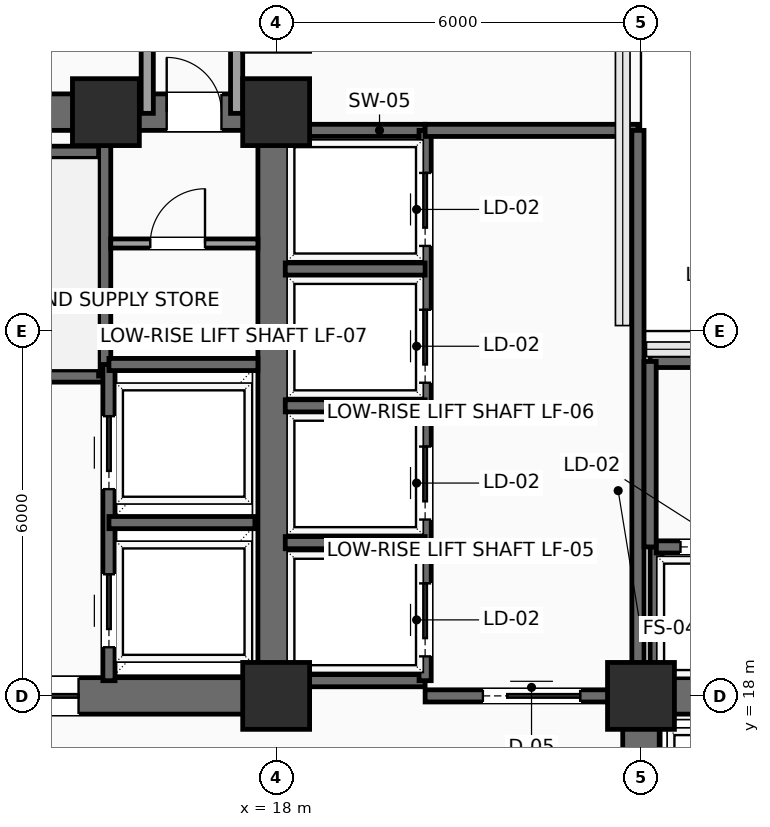
"""IFC4 building model, lengths in metres.
Left out: names, types, materials, properties, quantities, classifications, styles, units other than length and angle.
Written with IfcOpenShell. Run it as: python <this file> out.ifc"""

import sys

from ifc_helpers import new_model, si_unit, direction, frame, frame_2d, origin, origin_2d, place, context, subcontext, project, spatial, rectangle, extrude, element, fill, save


model = new_model("IFC4")
c1 = context("Model", 3, precision=1e-05, world=origin(), true_north=direction((0.0, 1.0)))
c2 = subcontext(c1, "Body", "Model", "MODEL_VIEW")
j1 = project(units=[si_unit("LENGTHUNIT", "METRE"), si_unit("PLANEANGLEUNIT", "RADIAN")], contexts=[c1])
p1 = place(None, origin())
s1 = spatial("IfcSite", under=j1, at=p1, CompositionType="ELEMENT")
p2 = place(p1, origin())
s2 = spatial("IfcBuilding", under=s1, at=p2, CompositionType="ELEMENT")
p3 = place(p2, frame((0.0, 0.0, 110.85)))
s3 = spatial("IfcBuildingStorey", under=s2, at=p3, CompositionType="ELEMENT", Elevation=110.85)
for number, where, z_axis, x_axis in (
    (1, (18.0, 18.0, 0.0), (0.0, 0.0, 1.0), (1.0, 0.0, 0.0)),
    (2, (15.2, 27.6, 0.0), (0.0, 0.0, 1.0), (1.0, 0.0, 0.0)),
    (3, (18.0, 27.6, 0.0), (0.0, 0.0, 1.0), (1.0, 0.0, 0.0)),
    (4, (24.0, 18.0, 0.0), (0.0, 0.0, 1.0), (1.0, 0.0, 0.0)),
):
    element("IfcColumn", number, at=place(p3, frame(where, z_axis=z_axis, x_axis=x_axis)), inside=s3, PredefinedType="COLUMN", context=c2, shape_type="SweptSolid", body=[
        extrude(rectangle(XDim=1.1, YDim=1.1, at=origin_2d()), origin(), (0.0, 0.0, 1.0), 4.8),
    ])
p4 = place(p3, frame((6.0, 18.0, 0.0), z_axis=(0.0, 0.0, 1.0), x_axis=(1.0, 0.0, 0.0)))
e5 = element("IfcWall", 5, at=p4, inside=s3, PredefinedType="SHEAR", context=c2, shape_type="SweptSolid", body=[
    extrude(rectangle(XDim=12.0, YDim=0.6, at=frame_2d((6.0, 0.0))), origin(), (0.0, 0.0, 1.0), 4.575),
])
p5 = place(p4, frame((7.15, 0.0, 0.0)))
e6 = element("IfcOpeningElement", 6, at=p5, cuts=e5, PredefinedType="OPENING", context=c2, shape_type="SweptSolid", body=[
    extrude(rectangle(XDim=1.6, YDim=2.3, at=frame_2d((0.8, 1.15))), frame((0.0, 0.31, 0.0), z_axis=(0.0, -1.0, 0.0), x_axis=(1.0, 0.0, 0.0)), (0.0, 0.0, 1.0), 0.62),
])
p6 = place(p3, frame((6.0, 27.6, 0.0), z_axis=(0.0, 0.0, 1.0), x_axis=(1.0, 0.0, 0.0)))
e7 = element("IfcWall", 7, at=p6, inside=s3, PredefinedType="SHEAR", context=c2, shape_type="SweptSolid", body=[
    extrude(rectangle(XDim=12.0, YDim=0.6, at=frame_2d((6.0, 0.0))), origin(), (0.0, 0.0, 1.0), 4.575),
])
p7 = place(p6, frame((10.2, 0.0, 0.0)))
e8 = element("IfcOpeningElement", 8, at=p7, cuts=e7, PredefinedType="OPENING", context=c2, shape_type="SweptSolid", body=[
    extrude(rectangle(XDim=0.9, YDim=2.15, at=frame_2d((0.45, 1.075))), frame((0.0, 0.31, 0.0), z_axis=(0.0, -1.0, 0.0), x_axis=(1.0, 0.0, 0.0)), (0.0, 0.0, 1.0), 0.62),
])
for number, where, z_axis, x_axis in (
    (9, (18.0, 18.0, 0.0), (0.0, 0.0, 1.0), (0.0, 1.0, 0.0)),
    (10, (24.0, 18.0, 0.0), (0.0, 0.0, 1.0), (1.0, 0.0, 0.0)),
):
    element("IfcWall", number, at=place(p3, frame(where, z_axis=z_axis, x_axis=x_axis)), inside=s3, PredefinedType="SHEAR", context=c2, shape_type="SweptSolid", body=[
        extrude(rectangle(XDim=9.6, YDim=0.6, at=frame_2d((4.8, 0.0))), origin(), (0.0, 0.0, 1.0), 4.575),
    ])
p8 = place(p3, frame((24.0, 6.0, 0.0), z_axis=(0.0, 0.0, 1.0), x_axis=(0.0, 1.0, 0.0)))
e11 = element("IfcWall", 11, at=p8, inside=s3, PredefinedType="SHEAR", context=c2, shape_type="SweptSolid", body=[
    extrude(rectangle(XDim=12.0, YDim=0.6, at=frame_2d((6.0, 0.0))), origin(), (0.0, 0.0, 1.0), 4.575),
])
p9 = place(p8, frame((7.15, 0.0, 0.0)))
e12 = element("IfcOpeningElement", 12, at=p9, cuts=e11, PredefinedType="OPENING", context=c2, shape_type="SweptSolid", body=[
    extrude(rectangle(XDim=1.6, YDim=2.3, at=frame_2d((0.8, 1.15))), frame((0.0, 0.31, 0.0), z_axis=(0.0, -1.0, 0.0), x_axis=(1.0, 0.0, 0.0)), (0.0, 0.0, 1.0), 0.62),
])
p10 = place(p3, frame((6.3, 23.26, 0.0), z_axis=(0.0, 0.0, 1.0), x_axis=(1.0, 0.0, 0.0)))
e13 = element("IfcWall", 13, at=p10, inside=s3, PredefinedType="SHEAR", context=c2, shape_type="SweptSolid", body=[
    extrude(rectangle(XDim=8.88, YDim=0.2, at=frame_2d((4.44, 0.0))), origin(), (0.0, 0.0, 1.0), 4.575),
])
p11 = place(p10, frame((0.35, 0.0, 0.0)))
e14 = element("IfcOpeningElement", 14, at=p11, cuts=e13, PredefinedType="OPENING", context=c2, shape_type="SweptSolid", body=[
    extrude(rectangle(XDim=1.1, YDim=2.2, at=frame_2d((0.55, 1.1))), frame((0.0, 0.11, 0.0), z_axis=(0.0, -1.0, 0.0), x_axis=(1.0, 0.0, 0.0)), (0.0, 0.0, 1.0), 0.22),
])
p12 = place(p3, frame((6.3, 26.94, 0.0), z_axis=(0.0, 0.0, 1.0), x_axis=(1.0, 0.0, 0.0)))
e15 = element("IfcWall", 15, at=p12, inside=s3, PredefinedType="SHEAR", context=c2, shape_type="SweptSolid", body=[
    extrude(rectangle(XDim=8.88, YDim=0.2, at=frame_2d((4.44, 0.0))), origin(), (0.0, 0.0, 1.0), 4.575),
])
p13 = place(p3, frame((15.18, 23.26, 0.0), z_axis=(0.0, 0.0, 1.0), x_axis=(0.0, 1.0, 0.0)))
e16 = element("IfcWall", 16, at=p13, inside=s3, PredefinedType="SHEAR", context=c2, shape_type="SweptSolid", body=[
    extrude(rectangle(XDim=4.04, YDim=0.2, at=frame_2d((2.02, 0.0))), origin(), (0.0, 0.0, 1.0), 4.575),
])
p14 = place(p3, frame((15.25, 18.25, 0.0), z_axis=(0.0, 0.0, 1.0), x_axis=(0.0, 1.0, 0.0)))
e17 = element("IfcWall", 17, at=p14, inside=s3, PredefinedType="SHEAR", context=c2, shape_type="SweptSolid", body=[
    extrude(rectangle(XDim=5.2, YDim=0.2, at=frame_2d((2.6, 0.0))), origin(), (0.0, 0.0, 1.0), 4.575),
])
p15 = place(p14, frame((0.55, 0.0, 0.0)))
e18 = element("IfcOpeningElement", 18, at=p15, cuts=e17, PredefinedType="OPENING", context=c2, shape_type="SweptSolid", body=[
    extrude(rectangle(XDim=1.2, YDim=2.2, at=frame_2d((0.6, 1.1))), frame((0.0, 0.11, 0.0), z_axis=(0.0, -1.0, 0.0), x_axis=(1.0, 0.0, 0.0)), (0.0, 0.0, 1.0), 0.22),
])
p16 = place(p14, frame((3.15, 0.0, 0.0)))
e19 = element("IfcOpeningElement", 19, at=p16, cuts=e17, PredefinedType="OPENING", context=c2, shape_type="SweptSolid", body=[
    extrude(rectangle(XDim=1.2, YDim=2.2, at=frame_2d((0.6, 1.1))), frame((0.0, 0.11, 0.0), z_axis=(0.0, -1.0, 0.0), x_axis=(1.0, 0.0, 0.0)), (0.0, 0.0, 1.0), 0.22),
])
p17 = place(p3, frame((15.25, 20.85, 0.0), z_axis=(0.0, 0.0, 1.0), x_axis=(1.0, 0.0, 0.0)))
e20 = element("IfcWall", 20, at=p17, inside=s3, PredefinedType="SHEAR", context=c2, shape_type="SweptSolid", body=[
    extrude(rectangle(XDim=2.4, YDim=0.2, at=frame_2d((1.2, 0.0))), origin(), (0.0, 0.0, 1.0), 4.575),
])
p18 = place(p3, frame((15.25, 23.45, 0.0), z_axis=(0.0, 0.0, 1.0), x_axis=(1.0, 0.0, 0.0)))
e21 = element("IfcWall", 21, at=p18, inside=s3, PredefinedType="SHEAR", context=c2, shape_type="SweptSolid", body=[
    extrude(rectangle(XDim=2.45, YDim=0.2, at=frame_2d((1.225, 0.0))), origin(), (0.0, 0.0, 1.0), 4.575),
])
p19 = place(p3, frame((15.28, 25.44, 0.0), z_axis=(0.0, 0.0, 1.0), x_axis=(1.0, 0.0, 0.0)))
e22 = element("IfcWall", 22, at=p19, inside=s3, PredefinedType="PARTITIONING", context=c2, shape_type="SweptSolid", body=[
    extrude(rectangle(XDim=2.42, YDim=0.15, at=frame_2d((1.21, 0.0))), origin(), (0.0, 0.0, 1.0), 4.575),
])
p20 = place(p19, frame((0.65, 0.0, 0.0)))
e23 = element("IfcOpeningElement", 23, at=p20, cuts=e22, PredefinedType="OPENING", context=c2, shape_type="SweptSolid", body=[
    extrude(rectangle(XDim=0.9, YDim=2.15, at=frame_2d((0.45, 1.075))), frame((0.0, 0.085, 0.0), z_axis=(0.0, -1.0, 0.0), x_axis=(1.0, 0.0, 0.0)), (0.0, 0.0, 1.0), 0.17),
])
for number, where, z_axis, x_axis in (
    (24, (18.1, 27.3, 0.0), (0.0, 0.0, 1.0), (1.0, 0.0, 0.0)),
    (25, (18.1, 18.25, 0.0), (0.0, 0.0, 1.0), (1.0, 0.0, 0.0)),
):
    element("IfcWall", number, at=place(p3, frame(where, z_axis=z_axis, x_axis=x_axis)), inside=s3, PredefinedType="SHEAR", context=c2, shape_type="SweptSolid", body=[
        extrude(rectangle(XDim=2.35, YDim=0.2, at=frame_2d((1.175, 0.0))), origin(), (0.0, 0.0, 1.0), 4.575),
    ])
p21 = place(p3, frame((20.45, 18.25, 0.0), z_axis=(0.0, 0.0, 1.0), x_axis=(0.0, 1.0, 0.0)))
e26 = element("IfcWall", 26, at=p21, inside=s3, PredefinedType="SHEAR", context=c2, shape_type="SweptSolid", body=[
    extrude(rectangle(XDim=9.05, YDim=0.2, at=frame_2d((4.525, 0.0))), origin(), (0.0, 0.0, 1.0), 4.575),
])
p22 = place(p21, frame((0.4, 0.0, 0.0)))
e27 = element("IfcOpeningElement", 27, at=p22, cuts=e26, PredefinedType="OPENING", context=c2, shape_type="SweptSolid", body=[
    extrude(rectangle(XDim=1.2, YDim=2.2, at=frame_2d((0.6, 1.1))), frame((0.0, 0.11, 0.0), z_axis=(0.0, -1.0, 0.0), x_axis=(1.0, 0.0, 0.0)), (0.0, 0.0, 1.0), 0.22),
])
p23 = place(p21, frame((2.65, 0.0, 0.0)))
e28 = element("IfcOpeningElement", 28, at=p23, cuts=e26, PredefinedType="OPENING", context=c2, shape_type="SweptSolid", body=[
    extrude(rectangle(XDim=1.2, YDim=2.2, at=frame_2d((0.6, 1.1))), frame((0.0, 0.11, 0.0), z_axis=(0.0, -1.0, 0.0), x_axis=(1.0, 0.0, 0.0)), (0.0, 0.0, 1.0), 0.22),
])
p24 = place(p21, frame((4.9, 0.0, 0.0)))
e29 = element("IfcOpeningElement", 29, at=p24, cuts=e26, PredefinedType="OPENING", context=c2, shape_type="SweptSolid", body=[
    extrude(rectangle(XDim=1.2, YDim=2.2, at=frame_2d((0.6, 1.1))), frame((0.0, 0.11, 0.0), z_axis=(0.0, -1.0, 0.0), x_axis=(1.0, 0.0, 0.0)), (0.0, 0.0, 1.0), 0.22),
])
p25 = place(p21, frame((7.15, 0.0, 0.0)))
e30 = element("IfcOpeningElement", 30, at=p25, cuts=e26, PredefinedType="OPENING", context=c2, shape_type="SweptSolid", body=[
    extrude(rectangle(XDim=1.2, YDim=2.2, at=frame_2d((0.6, 1.1))), frame((0.0, 0.11, 0.0), z_axis=(0.0, -1.0, 0.0), x_axis=(1.0, 0.0, 0.0)), (0.0, 0.0, 1.0), 0.22),
])
for number, where, z_axis, x_axis in (
    (31, (18.15, 20.52, 0.0), (0.0, 0.0, 1.0), (1.0, 0.0, 0.0)),
    (32, (18.15, 22.77, 0.0), (0.0, 0.0, 1.0), (1.0, 0.0, 0.0)),
    (33, (18.15, 25.02, 0.0), (0.0, 0.0, 1.0), (1.0, 0.0, 0.0)),
):
    element("IfcWall", number, at=place(p3, frame(where, z_axis=z_axis, x_axis=x_axis)), inside=s3, PredefinedType="SHEAR", context=c2, shape_type="SweptSolid", body=[
        extrude(rectangle(XDim=2.3, YDim=0.2, at=frame_2d((1.15, 0.0))), origin(), (0.0, 0.0, 1.0), 4.575),
    ])
p26 = place(p3, frame((20.45, 18.0, 0.0), z_axis=(0.0, 0.0, 1.0), x_axis=(1.0, 0.0, 0.0)))
e34 = element("IfcWall", 34, at=p26, inside=s3, PredefinedType="SHEAR", context=c2, shape_type="SweptSolid", body=[
    extrude(rectangle(XDim=3.5, YDim=0.2, at=frame_2d((1.75, 0.0))), origin(), (0.0, 0.0, 1.0), 4.575),
])
p27 = place(p26, frame((0.95, 0.0, 0.0)))
e35 = element("IfcOpeningElement", 35, at=p27, cuts=e34, PredefinedType="OPENING", context=c2, shape_type="SweptSolid", body=[
    extrude(rectangle(XDim=1.6, YDim=2.3, at=frame_2d((0.8, 1.15))), frame((0.0, 0.11, 0.0), z_axis=(0.0, -1.0, 0.0), x_axis=(1.0, 0.0, 0.0)), (0.0, 0.0, 1.0), 0.22),
])
p28 = place(p3, frame((20.45, 27.3, 0.0), z_axis=(0.0, 0.0, 1.0), x_axis=(1.0, 0.0, 0.0)))
e36 = element("IfcWall", 36, at=p28, inside=s3, PredefinedType="SHEAR", context=c2, shape_type="SweptSolid", body=[
    extrude(rectangle(XDim=3.5, YDim=0.2, at=frame_2d((1.75, 0.0))), origin(), (0.0, 0.0, 1.0), 4.575),
])
p29 = place(p3, frame((23.95, 18.0, 0.0), z_axis=(0.0, 0.0, 1.0), x_axis=(0.0, 1.0, 0.0)))
e37 = element("IfcWall", 37, at=p29, inside=s3, PredefinedType="SHEAR", context=c2, shape_type="SweptSolid", body=[
    extrude(rectangle(XDim=9.3, YDim=0.2, at=frame_2d((4.65, 0.0))), origin(), (0.0, 0.0, 1.0), 4.575),
])
p30 = place(p3, frame((24.25, 18.1, 0.0), z_axis=(0.0, 0.0, 1.0), x_axis=(0.0, 1.0, 0.0)))
e38 = element("IfcWall", 38, at=p30, inside=s3, PredefinedType="SHEAR", context=c2, shape_type="SweptSolid", body=[
    extrude(rectangle(XDim=2.35, YDim=0.2, at=frame_2d((1.175, 0.0))), origin(), (0.0, 0.0, 1.0), 4.575),
])
p31 = place(p3, frame((24.25, 20.45, 0.0), z_axis=(0.0, 0.0, 1.0), x_axis=(1.0, 0.0, 0.0)))
e39 = element("IfcWall", 39, at=p31, inside=s3, PredefinedType="SHEAR", context=c2, shape_type="SweptSolid", body=[
    extrude(rectangle(XDim=9.05, YDim=0.2, at=frame_2d((4.525, 0.0))), origin(), (0.0, 0.0, 1.0), 4.575),
])
p32 = place(p31, frame((0.4, 0.0, 0.0)))
e40 = element("IfcOpeningElement", 40, at=p32, cuts=e39, PredefinedType="OPENING", context=c2, shape_type="SweptSolid", body=[
    extrude(rectangle(XDim=1.2, YDim=2.2, at=frame_2d((0.6, 1.1))), frame((0.0, 0.11, 0.0), z_axis=(0.0, -1.0, 0.0), x_axis=(1.0, 0.0, 0.0)), (0.0, 0.0, 1.0), 0.22),
])
p33 = place(p31, frame((2.65, 0.0, 0.0)))
e41 = element("IfcOpeningElement", 41, at=p33, cuts=e39, PredefinedType="OPENING", context=c2, shape_type="SweptSolid", body=[
    extrude(rectangle(XDim=1.2, YDim=2.2, at=frame_2d((0.6, 1.1))), frame((0.0, 0.11, 0.0), z_axis=(0.0, -1.0, 0.0), x_axis=(1.0, 0.0, 0.0)), (0.0, 0.0, 1.0), 0.22),
])
p34 = place(p31, frame((4.9, 0.0, 0.0)))
e42 = element("IfcOpeningElement", 42, at=p34, cuts=e39, PredefinedType="OPENING", context=c2, shape_type="SweptSolid", body=[
    extrude(rectangle(XDim=1.2, YDim=2.2, at=frame_2d((0.6, 1.1))), frame((0.0, 0.11, 0.0), z_axis=(0.0, -1.0, 0.0), x_axis=(1.0, 0.0, 0.0)), (0.0, 0.0, 1.0), 0.22),
])
p35 = place(p31, frame((7.15, 0.0, 0.0)))
e43 = element("IfcOpeningElement", 43, at=p35, cuts=e39, PredefinedType="OPENING", context=c2, shape_type="SweptSolid", body=[
    extrude(rectangle(XDim=1.2, YDim=2.2, at=frame_2d((0.6, 1.1))), frame((0.0, 0.11, 0.0), z_axis=(0.0, -1.0, 0.0), x_axis=(1.0, 0.0, 0.0)), (0.0, 0.0, 1.0), 0.22),
])
p36 = place(p3, frame((24.15, 23.5, 0.0), z_axis=(0.0, 0.0, 1.0), x_axis=(1.0, 0.0, 0.0)))
e44 = element("IfcWall", 44, at=p36, inside=s3, PredefinedType="SHEAR", context=c2, shape_type="SweptSolid", body=[
    extrude(rectangle(XDim=9.15, YDim=0.2, at=frame_2d((4.575, 0.0))), origin(), (0.0, 0.0, 1.0), 4.575),
])
p37 = place(p3, frame((24.15, 20.45, 0.0), z_axis=(0.0, 0.0, 1.0), x_axis=(0.0, 1.0, 0.0)))
e45 = element("IfcWall", 45, at=p37, inside=s3, PredefinedType="SHEAR", context=c2, shape_type="SweptSolid", body=[
    extrude(rectangle(XDim=3.05, YDim=0.2, at=frame_2d((1.525, 0.0))), origin(), (0.0, 0.0, 1.0), 4.575),
])
for number, where, z_axis, x_axis in (
    (46, (17.35, 30.25, 0.0), (0.0, 0.0, 1.0), (0.0, -1.0, 0.0)),
    (47, (15.88, 27.58, 0.0), (0.0, 0.0, 1.0), (0.0, 1.0, 0.0)),
):
    element("IfcWall", number, at=place(p3, frame(where, z_axis=z_axis, x_axis=x_axis)), inside=s3, PredefinedType="PARTITIONING", context=c2, shape_type="SweptSolid", body=[
        extrude(rectangle(XDim=2.67, YDim=0.2, at=frame_2d((1.335, 0.0))), origin(), (0.0, 0.0, 1.0), 4.575),
    ])
p38 = place(p5, origin())
e48 = element("IfcDoor", 48, at=p38, inside=s3, OperationType="DOUBLE_DOOR_SLIDING", PredefinedType="DOOR", context=c2, shape_type="SweptSolid", body=[
    extrude(rectangle(XDim=1.6, YDim=2.3, at=frame_2d((0.8, 1.15))), frame((0.0, 0.025, 0.0), z_axis=(0.0, -1.0, 0.0), x_axis=(1.0, 0.0, 0.0)), (0.0, 0.0, 1.0), 0.05),
])
fill(e6, e48)
p39 = place(p7, origin())
e49 = element("IfcDoor", 49, at=p39, inside=s3, OperationType="SINGLE_SWING_LEFT", PredefinedType="DOOR", context=c2, shape_type="SweptSolid", body=[
    extrude(rectangle(XDim=0.9, YDim=2.15, at=frame_2d((0.45, 1.075))), frame((0.0, 0.025, 0.0), z_axis=(0.0, -1.0, 0.0), x_axis=(1.0, 0.0, 0.0)), (0.0, 0.0, 1.0), 0.05),
])
fill(e8, e49)
p40 = place(p15, origin())
e50 = element("IfcDoor", 50, at=p40, inside=s3, OperationType="SLIDING_TO_RIGHT", PredefinedType="DOOR", context=c2, shape_type="SweptSolid", body=[
    extrude(rectangle(XDim=1.2, YDim=2.2, at=frame_2d((0.6, 1.1))), frame((0.0, 0.025, 0.0), z_axis=(0.0, -1.0, 0.0), x_axis=(1.0, 0.0, 0.0)), (0.0, 0.0, 1.0), 0.05),
])
fill(e18, e50)
p41 = place(p16, origin())
e51 = element("IfcDoor", 51, at=p41, inside=s3, OperationType="SLIDING_TO_RIGHT", PredefinedType="DOOR", context=c2, shape_type="SweptSolid", body=[
    extrude(rectangle(XDim=1.2, YDim=2.2, at=frame_2d((0.6, 1.1))), frame((0.0, 0.025, 0.0), z_axis=(0.0, -1.0, 0.0), x_axis=(1.0, 0.0, 0.0)), (0.0, 0.0, 1.0), 0.05),
])
fill(e19, e51)
p42 = place(p20, origin())
e52 = element("IfcDoor", 52, at=p42, inside=s3, OperationType="SINGLE_SWING_RIGHT", PredefinedType="DOOR", context=c2, shape_type="SweptSolid", body=[
    extrude(rectangle(XDim=0.9, YDim=2.15, at=frame_2d((0.45, 1.075))), frame((0.0, 0.025, 0.0), z_axis=(0.0, -1.0, 0.0), x_axis=(1.0, 0.0, 0.0)), (0.0, 0.0, 1.0), 0.05),
])
fill(e23, e52)
p43 = place(p22, origin())
e53 = element("IfcDoor", 53, at=p43, inside=s3, OperationType="SLIDING_TO_RIGHT", PredefinedType="DOOR", context=c2, shape_type="SweptSolid", body=[
    extrude(rectangle(XDim=1.2, YDim=2.2, at=frame_2d((0.6, 1.1))), frame((0.0, 0.025, 0.0), z_axis=(0.0, -1.0, 0.0), x_axis=(1.0, 0.0, 0.0)), (0.0, 0.0, 1.0), 0.05),
])
fill(e27, e53)
p44 = place(p23, origin())
e54 = element("IfcDoor", 54, at=p44, inside=s3, OperationType="SLIDING_TO_RIGHT", PredefinedType="DOOR", context=c2, shape_type="SweptSolid", body=[
    extrude(rectangle(XDim=1.2, YDim=2.2, at=frame_2d((0.6, 1.1))), frame((0.0, 0.025, 0.0), z_axis=(0.0, -1.0, 0.0), x_axis=(1.0, 0.0, 0.0)), (0.0, 0.0, 1.0), 0.05),
])
fill(e28, e54)
p45 = place(p24, origin())
e55 = element("IfcDoor", 55, at=p45, inside=s3, OperationType="SLIDING_TO_RIGHT", PredefinedType="DOOR", context=c2, shape_type="SweptSolid", body=[
    extrude(rectangle(XDim=1.2, YDim=2.2, at=frame_2d((0.6, 1.1))), frame((0.0, 0.025, 0.0), z_axis=(0.0, -1.0, 0.0), x_axis=(1.0, 0.0, 0.0)), (0.0, 0.0, 1.0), 0.05),
])
fill(e29, e55)
p46 = place(p25, origin())
e56 = element("IfcDoor", 56, at=p46, inside=s3, OperationType="SLIDING_TO_RIGHT", PredefinedType="DOOR", context=c2, shape_type="SweptSolid", body=[
    extrude(rectangle(XDim=1.2, YDim=2.2, at=frame_2d((0.6, 1.1))), frame((0.0, 0.025, 0.0), z_axis=(0.0, -1.0, 0.0), x_axis=(1.0, 0.0, 0.0)), (0.0, 0.0, 1.0), 0.05),
])
fill(e30, e56)
p47 = place(p27, origin())
e57 = element("IfcDoor", 57, at=p47, inside=s3, OperationType="DOUBLE_DOOR_SLIDING", PredefinedType="DOOR", context=c2, shape_type="SweptSolid", body=[
    extrude(rectangle(XDim=1.6, YDim=2.3, at=frame_2d((0.8, 1.15))), frame((0.0, 0.025, 0.0), z_axis=(0.0, -1.0, 0.0), x_axis=(1.0, 0.0, 0.0)), (0.0, 0.0, 1.0), 0.05),
])
fill(e35, e57)
p48 = place(p32, origin())
e58 = element("IfcDoor", 58, at=p48, inside=s3, OperationType="SLIDING_TO_RIGHT", PredefinedType="DOOR", context=c2, shape_type="SweptSolid", body=[
    extrude(rectangle(XDim=1.2, YDim=2.2, at=frame_2d((0.6, 1.1))), frame((0.0, 0.025, 0.0), z_axis=(0.0, -1.0, 0.0), x_axis=(1.0, 0.0, 0.0)), (0.0, 0.0, 1.0), 0.05),
])
fill(e40, e58)
save(model, sys.argv[1])
